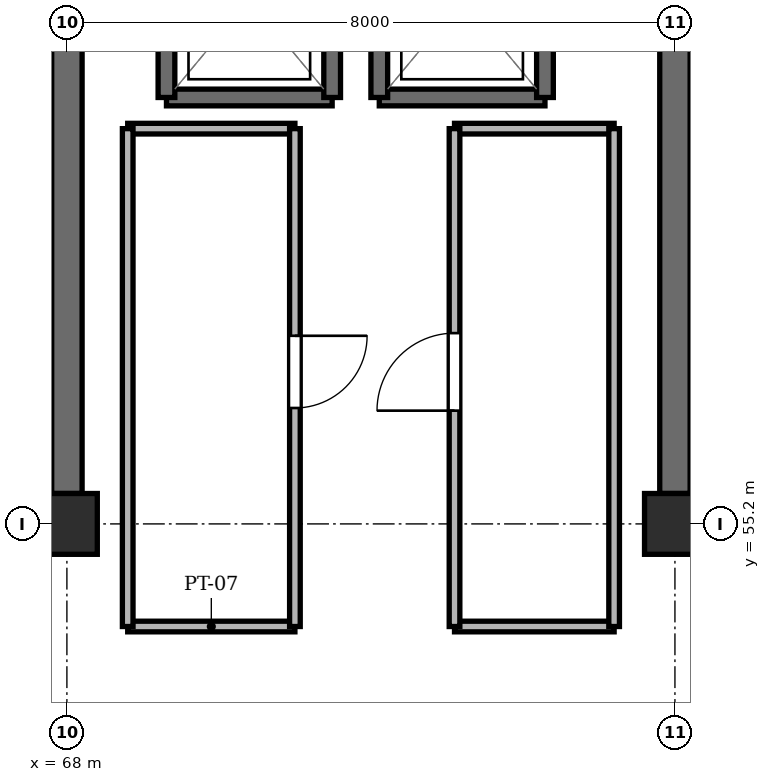
"""IFC4 building model, lengths in metres.
Left out: names, types, materials, properties, quantities, classifications, styles, units other than length and angle.
Written with IfcOpenShell. Run it as: python <this file> out.ifc"""

import sys

from ifc_helpers import new_model, si_unit, direction, frame, frame_2d, origin, origin_2d, place, context, subcontext, project, spatial, rectangle, extrude, element, fill, save


model = new_model("IFC4")
c1 = context("Model", 3, precision=1e-05, world=origin(), true_north=direction((0.0, 1.0)))
c2 = subcontext(c1, "Body", "Model", "MODEL_VIEW")
j1 = project(units=[si_unit("LENGTHUNIT", "METRE"), si_unit("PLANEANGLEUNIT", "RADIAN")], contexts=[c1])
p1 = place(None, origin())
s1 = spatial("IfcSite", under=j1, at=p1, CompositionType="ELEMENT")
p2 = place(p1, origin())
s2 = spatial("IfcBuilding", under=s1, at=p2, CompositionType="ELEMENT")
p3 = place(p2, frame((0.0, 0.0, 53.55)))
s3 = spatial("IfcBuildingStorey", under=s2, at=p3, CompositionType="ELEMENT", Elevation=53.55)
for number, where, z_axis, x_axis in (
    (1, (68.0, 55.2, -0.22), (0.0, 0.0, 1.0), (1.0, 0.0, 0.0)),
    (2, (76.0, 55.2, -0.22), (0.0, 0.0, 1.0), (1.0, 0.0, 0.0)),
):
    element("IfcColumn", number, at=place(p3, frame(where, z_axis=z_axis, x_axis=x_axis)), inside=s3, PredefinedType="COLUMN", context=c2, shape_type="SweptSolid", body=[
        extrude(rectangle(XDim=0.8, YDim=0.8, at=origin_2d()), origin(), (0.0, 0.0, 1.0), 3.25),
    ])
for number, where, z_axis, x_axis in (
    (3, (68.0, 55.6, 0.0), (0.0, 0.0, 1.0), (0.0, 1.0, 0.0)),
    (4, (76.0, 55.6, 0.0), (0.0, 0.0, 1.0), (0.0, 1.0, 0.0)),
):
    element("IfcWall", number, at=place(p3, frame(where, z_axis=z_axis, x_axis=x_axis)), inside=s3, PredefinedType="SHEAR", context=c2, shape_type="SweptSolid", body=[
        extrude(rectangle(XDim=6.45, YDim=0.4, at=frame_2d((3.225, 0.0))), origin(), (0.0, 0.0, 1.0), 3.03),
    ])
p4 = place(p3, frame((69.31, 60.81, 0.0), z_axis=(0.0, 0.0, 1.0), x_axis=(1.0, 0.0, 0.0)))
e5 = element("IfcWall", 5, at=p4, inside=s3, PredefinedType="SHEAR", context=c2, shape_type="SweptSolid", body=[
    extrude(rectangle(XDim=2.18, YDim=0.22, at=frame_2d((1.09, 0.0))), origin(), (0.0, 0.0, 1.0), 3.03),
])
for number, where, z_axis, x_axis in (
    (6, (69.31, 63.39, 0.0), (0.0, 0.0, 1.0), (0.0, -1.0, 0.0)),
    (7, (71.49, 60.81, 0.0), (0.0, 0.0, 1.0), (0.0, 1.0, 0.0)),
):
    element("IfcWall", number, at=place(p3, frame(where, z_axis=z_axis, x_axis=x_axis)), inside=s3, PredefinedType="SHEAR", context=c2, shape_type="SweptSolid", body=[
        extrude(rectangle(XDim=2.58, YDim=0.22, at=frame_2d((1.29, 0.0))), origin(), (0.0, 0.0, 1.0), 3.03),
    ])
p5 = place(p3, frame((72.11, 60.81, 0.0), z_axis=(0.0, 0.0, 1.0), x_axis=(1.0, 0.0, 0.0)))
e8 = element("IfcWall", 8, at=p5, inside=s3, PredefinedType="SHEAR", context=c2, shape_type="SweptSolid", body=[
    extrude(rectangle(XDim=2.18, YDim=0.22, at=frame_2d((1.09, 0.0))), origin(), (0.0, 0.0, 1.0), 3.03),
])
for number, where, z_axis, x_axis in (
    (9, (72.11, 63.39, 0.0), (0.0, 0.0, 1.0), (0.0, -1.0, 0.0)),
    (10, (74.29, 60.81, 0.0), (0.0, 0.0, 1.0), (0.0, 1.0, 0.0)),
):
    element("IfcWall", number, at=place(p3, frame(where, z_axis=z_axis, x_axis=x_axis)), inside=s3, PredefinedType="SHEAR", context=c2, shape_type="SweptSolid", body=[
        extrude(rectangle(XDim=2.58, YDim=0.22, at=frame_2d((1.29, 0.0))), origin(), (0.0, 0.0, 1.0), 3.03),
    ])
for number, where, z_axis, x_axis in (
    (11, (68.8, 53.85, 0.0), (0.0, 0.0, 1.0), (1.0, 0.0, 0.0)),
    (12, (68.8, 60.4, 0.0), (0.0, 0.0, 1.0), (1.0, 0.0, 0.0)),
):
    element("IfcWall", number, at=place(p3, frame(where, z_axis=z_axis, x_axis=x_axis)), inside=s3, PredefinedType="PARTITIONING", context=c2, shape_type="SweptSolid", body=[
        extrude(rectangle(XDim=2.2, YDim=0.14, at=frame_2d((1.1, 0.0))), origin(), (0.0, 0.0, 1.0), 2.53),
    ])
p6 = place(p3, frame((68.8, 53.85, 0.0), z_axis=(0.0, 0.0, 1.0), x_axis=(0.0, 1.0, 0.0)))
e13 = element("IfcWall", 13, at=p6, inside=s3, PredefinedType="PARTITIONING", context=c2, shape_type="SweptSolid", body=[
    extrude(rectangle(XDim=6.55, YDim=0.14, at=frame_2d((3.275, 0.0))), origin(), (0.0, 0.0, 1.0), 2.53),
])
p7 = place(p3, frame((71.0, 53.85, 0.0), z_axis=(0.0, 0.0, 1.0), x_axis=(0.0, 1.0, 0.0)))
e14 = element("IfcWall", 14, at=p7, inside=s3, PredefinedType="PARTITIONING", context=c2, shape_type="SweptSolid", body=[
    extrude(rectangle(XDim=6.55, YDim=0.14, at=frame_2d((3.275, 0.0))), origin(), (0.0, 0.0, 1.0), 2.53),
])
p8 = place(p7, frame((2.875, 0.0, 0.0)))
e15 = element("IfcOpeningElement", 15, at=p8, cuts=e14, PredefinedType="OPENING", context=c2, shape_type="SweptSolid", body=[
    extrude(rectangle(XDim=0.95, YDim=2.1, at=frame_2d((0.475, 1.05))), frame((0.0, 0.082, 0.0), z_axis=(0.0, -1.0, 0.0), x_axis=(1.0, 0.0, 0.0)), (0.0, 0.0, 1.0), 0.164),
])
for number, where, z_axis, x_axis in (
    (16, (73.1, 53.85, 0.0), (0.0, 0.0, 1.0), (1.0, 0.0, 0.0)),
    (17, (73.1, 60.4, 0.0), (0.0, 0.0, 1.0), (1.0, 0.0, 0.0)),
):
    element("IfcWall", number, at=place(p3, frame(where, z_axis=z_axis, x_axis=x_axis)), inside=s3, PredefinedType="PARTITIONING", context=c2, shape_type="SweptSolid", body=[
        extrude(rectangle(XDim=2.1, YDim=0.14, at=frame_2d((1.05, 0.0))), origin(), (0.0, 0.0, 1.0), 2.53),
    ])
p9 = place(p3, frame((73.1, 53.85, 0.0), z_axis=(0.0, 0.0, 1.0), x_axis=(0.0, 1.0, 0.0)))
e18 = element("IfcWall", 18, at=p9, inside=s3, PredefinedType="PARTITIONING", context=c2, shape_type="SweptSolid", body=[
    extrude(rectangle(XDim=6.55, YDim=0.14, at=frame_2d((3.275, 0.0))), origin(), (0.0, 0.0, 1.0), 2.53),
])
p10 = place(p9, frame((2.84, 0.0, 0.0)))
e19 = element("IfcOpeningElement", 19, at=p10, cuts=e18, PredefinedType="OPENING", context=c2, shape_type="SweptSolid", body=[
    extrude(rectangle(XDim=1.02, YDim=2.1, at=frame_2d((0.51, 1.05))), frame((0.0, 0.082, 0.0), z_axis=(0.0, -1.0, 0.0), x_axis=(1.0, 0.0, 0.0)), (0.0, 0.0, 1.0), 0.164),
])
p11 = place(p3, frame((75.2, 53.85, 0.0), z_axis=(0.0, 0.0, 1.0), x_axis=(0.0, 1.0, 0.0)))
e20 = element("IfcWall", 20, at=p11, inside=s3, PredefinedType="PARTITIONING", context=c2, shape_type="SweptSolid", body=[
    extrude(rectangle(XDim=6.55, YDim=0.14, at=frame_2d((3.275, 0.0))), origin(), (0.0, 0.0, 1.0), 2.53),
])
p12 = place(p8, frame((0.95, 0.0, 0.0), z_axis=(0.0, 0.0, 1.0), x_axis=(-1.0, 0.0, 0.0)))
e21 = element("IfcDoor", 21, at=p12, inside=s3, OperationType="SINGLE_SWING_RIGHT", PredefinedType="DOOR", context=c2, shape_type="SweptSolid", body=[
    extrude(rectangle(XDim=0.95, YDim=2.1, at=frame_2d((0.475, 1.05))), frame((0.0, 0.025, 0.0), z_axis=(0.0, -1.0, 0.0), x_axis=(1.0, 0.0, 0.0)), (0.0, 0.0, 1.0), 0.05),
])
fill(e15, e21)
p13 = place(p10, origin())
e22 = element("IfcDoor", 22, at=p13, inside=s3, OperationType="SINGLE_SWING_LEFT", PredefinedType="DOOR", context=c2, shape_type="SweptSolid", body=[
    extrude(rectangle(XDim=1.02, YDim=2.1, at=frame_2d((0.51, 1.05))), frame((0.0, 0.025, 0.0), z_axis=(0.0, -1.0, 0.0), x_axis=(1.0, 0.0, 0.0)), (0.0, 0.0, 1.0), 0.05),
])
fill(e19, e22)
save(model, sys.argv[1])
